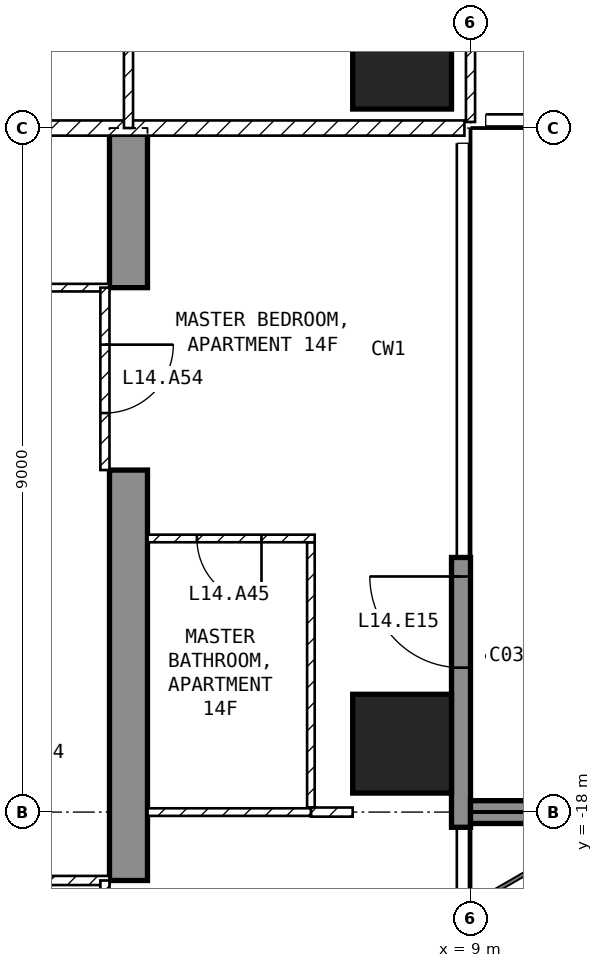
"""IFC4 building model, lengths in metres.
Left out: names, types, materials, properties, quantities, classifications, styles, units other than length and angle.
Written with IfcOpenShell. Run it as: python <this file> out.ifc"""

import sys

from ifc_helpers import new_model, si_unit, direction, frame, frame_2d, origin, origin_2d, place, context, subcontext, project, spatial, polyline, rectangle, outline, extrude, element, fill, save


model = new_model("IFC4")
c1 = context("Model", 3, precision=1e-05, world=origin(), true_north=direction((0.0, 1.0)))
c2 = subcontext(c1, "Body", "Model", "MODEL_VIEW")
j1 = project(units=[si_unit("LENGTHUNIT", "METRE"), si_unit("PLANEANGLEUNIT", "RADIAN")], contexts=[c1])
p1 = place(None, origin())
s1 = spatial("IfcSite", under=j1, at=p1, CompositionType="ELEMENT")
p2 = place(p1, origin())
s2 = spatial("IfcBuilding", under=s1, at=p2, CompositionType="ELEMENT")
p3 = place(p2, frame((0.0, 0.0, 68.0)))
s3 = spatial("IfcBuildingStorey", under=s2, at=p3, CompositionType="ELEMENT", Elevation=68.0)
for number, where, z_axis, x_axis in (
    (1, (8.1, -17.1, -0.25), (0.0, 0.0, 1.0), (1.0, 0.0, 0.0)),
    (2, (8.1, -8.1, -0.25), (0.0, 0.0, 1.0), (1.0, 0.0, 0.0)),
):
    element("IfcColumn", number, at=place(p3, frame(where, z_axis=z_axis, x_axis=x_axis)), inside=s3, PredefinedType="COLUMN", context=c2, shape_type="SweptSolid", body=[
        extrude(rectangle(XDim=1.3, YDim=1.3, at=origin_2d()), origin(), (0.0, 0.0, 1.0), 3.5),
    ])
p4 = place(p3, frame((4.25, -25.45, -0.25), z_axis=(1.0, 0.0, 0.0), x_axis=(0.0, 1.0, 0.0)))
e3 = element("IfcWall", 3, at=p4, inside=s3, PredefinedType="SHEAR", context=c2, shape_type="SweptSolid", body=[
    extrude(outline(polyline([(0.0, 0.0), (4.15, 0.0), (4.15, 2.65), (6.55, 2.65), (6.55, 0.0), (11.95, 0.0), (11.95, 2.65), (14.35, 2.65), (14.35, 0.0), (16.45, 0.0), (16.45, 3.5), (0.0, 3.5), (0.0, 0.0)])), origin(), (0.0, 0.0, 1.0), 0.5),
])
p5 = place(p3, frame((8.875, -18.2, 0.0), z_axis=(0.0, 0.0, 1.0), x_axis=(0.0, 1.0, 0.0)))
e4 = element("IfcWall", 4, at=p5, inside=s3, PredefinedType="SOLIDWALL", context=c2, shape_type="SweptSolid", body=[
    extrude(rectangle(XDim=3.55, YDim=0.25, at=frame_2d((1.775, 0.0))), origin(), (0.0, 0.0, 1.0), 3.25),
])
p6 = place(p5, frame((2.1, 0.0, 0.0)))
e5 = element("IfcOpeningElement", 5, at=p6, cuts=e4, PredefinedType="OPENING", context=c2, shape_type="SweptSolid", body=[
    extrude(rectangle(XDim=1.2, YDim=2.4, at=frame_2d((0.6, 1.2))), frame((0.0, 0.135, 0.0), z_axis=(0.0, -1.0, 0.0), x_axis=(1.0, 0.0, 0.0)), (0.0, 0.0, 1.0), 0.27),
])
p7 = place(p3, frame((9.0, -18.0, 0.0), z_axis=(0.0, 0.0, 1.0), x_axis=(1.0, 0.0, 0.0)))
e6 = element("IfcWall", 6, at=p7, inside=s3, PredefinedType="SOLIDWALL", context=c2, shape_type="SweptSolid", body=[
    extrude(rectangle(XDim=2.7, YDim=0.3, at=frame_2d((1.35, 0.0))), origin(), (0.0, 0.0, 1.0), 3.25),
])
p8 = place(p3, frame((8.92, -9.0, 0.0), z_axis=(0.0, 0.0, 1.0), x_axis=(-1.0, 0.0, 0.0)))
e7 = element("IfcWall", 7, at=p8, inside=s3, PredefinedType="PARTITIONING", context=c2, shape_type="SweptSolid", body=[
    extrude(rectangle(XDim=17.84, YDim=0.2, at=frame_2d((8.92, 0.0))), origin(), (0.0, 0.0, 1.0), 3.25),
])
p9 = place(p8, frame((8.42, 0.0, 0.0)))
e8 = element("IfcOpeningElement", 8, at=p9, cuts=e7, PredefinedType="OPENING", context=c2, shape_type="SweptSolid", body=[
    extrude(rectangle(XDim=1.0, YDim=2.1, at=frame_2d((0.5, 1.05))), frame((0.0, 0.11, 0.0), z_axis=(0.0, -1.0, 0.0), x_axis=(1.0, 0.0, 0.0)), (0.0, 0.0, 1.0), 0.22),
])
p10 = place(p3, frame((9.0, -8.92, 0.0), z_axis=(0.0, 0.0, 1.0), x_axis=(0.0, 1.0, 0.0)))
e9 = element("IfcWall", 9, at=p10, inside=s3, PredefinedType="PARTITIONING", context=c2, shape_type="SweptSolid", body=[
    extrude(rectangle(XDim=7.62, YDim=0.12, at=frame_2d((3.81, 0.0))), origin(), (0.0, 0.0, 1.0), 3.25),
])
p11 = place(p10, frame((2.67, 0.0, 0.0)))
e10 = element("IfcOpeningElement", 10, at=p11, cuts=e9, PredefinedType="OPENING", context=c2, shape_type="SweptSolid", body=[
    extrude(rectangle(XDim=0.9, YDim=2.1, at=frame_2d((0.45, 1.05))), frame((0.0, 0.07, 0.0), z_axis=(0.0, -1.0, 0.0), x_axis=(1.0, 0.0, 0.0)), (0.0, 0.0, 1.0), 0.14),
])
p12 = place(p3, frame((4.5, -9.0, 0.0), z_axis=(0.0, 0.0, 1.0), x_axis=(0.0, 1.0, 0.0)))
e11 = element("IfcWall", 11, at=p12, inside=s3, PredefinedType="PARTITIONING", context=c2, shape_type="SweptSolid", body=[
    extrude(rectangle(XDim=7.7, YDim=0.12, at=frame_2d((3.85, 0.0))), origin(), (0.0, 0.0, 1.0), 3.25),
])
p13 = place(p12, frame((3.4, 0.0, 0.0)))
e12 = element("IfcOpeningElement", 12, at=p13, cuts=e11, PredefinedType="OPENING", context=c2, shape_type="SweptSolid", body=[
    extrude(rectangle(XDim=0.9, YDim=2.1, at=frame_2d((0.45, 1.05))), frame((0.0, 0.07, 0.0), z_axis=(0.0, -1.0, 0.0), x_axis=(1.0, 0.0, 0.0)), (0.0, 0.0, 1.0), 0.14),
])
p14 = place(p3, frame((4.25, -11.1, 0.0), z_axis=(0.0, 0.0, 1.0), x_axis=(-1.0, 0.0, 0.0)))
e13 = element("IfcWall", 13, at=p14, inside=s3, PredefinedType="PARTITIONING", context=c2, shape_type="SweptSolid", body=[
    extrude(rectangle(XDim=2.15, YDim=0.1, at=frame_2d((1.075, 0.0))), origin(), (0.0, 0.0, 1.0), 3.25),
])
p15 = place(p3, frame((4.25, -18.9, 0.0), z_axis=(0.0, 0.0, 1.0), x_axis=(-1.0, 0.0, 0.0)))
e14 = element("IfcWall", 14, at=p15, inside=s3, PredefinedType="PARTITIONING", context=c2, shape_type="SweptSolid", body=[
    extrude(rectangle(XDim=8.5, YDim=0.12, at=frame_2d((4.25, 0.0))), origin(), (0.0, 0.0, 1.0), 3.25),
])
p16 = place(p15, frame((1.925, 0.0, 0.0)))
e15 = element("IfcOpeningElement", 15, at=p16, cuts=e14, PredefinedType="OPENING", context=c2, shape_type="SweptSolid", body=[
    extrude(rectangle(XDim=0.9, YDim=2.1, at=frame_2d((0.45, 1.05))), frame((0.0, 0.07, 0.0), z_axis=(0.0, -1.0, 0.0), x_axis=(1.0, 0.0, 0.0)), (0.0, 0.0, 1.0), 0.14),
])
p17 = place(p3, frame((6.9, -17.94, 0.0), z_axis=(0.0, 0.0, 1.0), x_axis=(0.0, 1.0, 0.0)))
e16 = element("IfcWall", 16, at=p17, inside=s3, PredefinedType="PARTITIONING", context=c2, shape_type="SweptSolid", body=[
    extrude(rectangle(XDim=3.49, YDim=0.1, at=frame_2d((1.745, 0.0))), origin(), (0.0, 0.0, 1.0), 3.25),
])
p18 = place(p3, frame((6.95, -14.4, 0.0), z_axis=(0.0, 0.0, 1.0), x_axis=(-1.0, 0.0, 0.0)))
e17 = element("IfcWall", 17, at=p18, inside=s3, PredefinedType="PARTITIONING", context=c2, shape_type="SweptSolid", body=[
    extrude(rectangle(XDim=2.2, YDim=0.1, at=frame_2d((1.1, 0.0))), origin(), (0.0, 0.0, 1.0), 3.25),
])
p19 = place(p18, frame((0.7, 0.0, 0.0)))
e18 = element("IfcOpeningElement", 18, at=p19, cuts=e17, PredefinedType="OPENING", context=c2, shape_type="SweptSolid", body=[
    extrude(rectangle(XDim=0.85, YDim=2.1, at=frame_2d((0.425, 1.05))), frame((0.0, 0.06, 0.0), z_axis=(0.0, -1.0, 0.0), x_axis=(1.0, 0.0, 0.0)), (0.0, 0.0, 1.0), 0.12),
])
p20 = place(p3, frame((7.45, -18.0, 0.0), z_axis=(0.0, 0.0, 1.0), x_axis=(-1.0, 0.0, 0.0)))
e19 = element("IfcWall", 19, at=p20, inside=s3, PredefinedType="PARTITIONING", context=c2, shape_type="SweptSolid", body=[
    extrude(rectangle(XDim=0.55, YDim=0.12, at=frame_2d((0.275, 0.0))), origin(), (0.0, 0.0, 1.0), 3.25),
])
p21 = place(p3, frame((6.9, -18.0, 0.0), z_axis=(0.0, 0.0, 1.0), x_axis=(-1.0, 0.0, 0.0)))
e20 = element("IfcWall", 20, at=p21, inside=s3, PredefinedType="PARTITIONING", context=c2, shape_type="SweptSolid", body=[
    extrude(rectangle(XDim=2.15, YDim=0.1, at=frame_2d((1.075, 0.0))), origin(), (0.0, 0.0, 1.0), 3.25),
])
p22 = place(p3, frame((4.19, -11.1, 0.0), z_axis=(0.0, 0.0, 1.0), x_axis=(0.0, -1.0, 0.0)))
e21 = element("IfcWall", 21, at=p22, inside=s3, PredefinedType="PARTITIONING", context=c2, shape_type="SweptSolid", body=[
    extrude(rectangle(XDim=2.4, YDim=0.12, at=frame_2d((1.2, 0.0))), origin(), (0.0, 0.0, 1.0), 2.4),
])
p23 = place(p22, frame((0.75, 0.0, 0.0)))
e22 = element("IfcOpeningElement", 22, at=p23, cuts=e21, PredefinedType="OPENING", context=c2, shape_type="SweptSolid", body=[
    extrude(rectangle(XDim=0.9, YDim=2.1, at=frame_2d((0.45, 1.05))), frame((0.0, 0.07, 0.0), z_axis=(0.0, -1.0, 0.0), x_axis=(1.0, 0.0, 0.0)), (0.0, 0.0, 1.0), 0.14),
])
p24 = place(p3, frame((4.19, -18.9, 0.0), z_axis=(0.0, 0.0, 1.0), x_axis=(0.0, -1.0, 0.0)))
e23 = element("IfcWall", 23, at=p24, inside=s3, PredefinedType="PARTITIONING", context=c2, shape_type="SweptSolid", body=[
    extrude(rectangle(XDim=2.4, YDim=0.12, at=frame_2d((1.2, 0.0))), origin(), (0.0, 0.0, 1.0), 2.4),
])
p25 = place(p24, frame((0.75, 0.0, 0.0)))
e24 = element("IfcOpeningElement", 24, at=p25, cuts=e23, PredefinedType="OPENING", context=c2, shape_type="SweptSolid", body=[
    extrude(rectangle(XDim=0.9, YDim=2.1, at=frame_2d((0.45, 1.05))), frame((0.0, 0.07, 0.0), z_axis=(0.0, -1.0, 0.0), x_axis=(1.0, 0.0, 0.0)), (0.0, 0.0, 1.0), 0.14),
])
p26 = place(p6, origin())
e25 = element("IfcDoor", 25, at=p26, inside=s3, OperationType="SINGLE_SWING_RIGHT", PredefinedType="DOOR", context=c2, shape_type="SweptSolid", body=[
    extrude(rectangle(XDim=1.2, YDim=2.4, at=frame_2d((0.6, 1.2))), frame((0.0, 0.025, 0.0), z_axis=(0.0, -1.0, 0.0), x_axis=(1.0, 0.0, 0.0)), (0.0, 0.0, 1.0), 0.05),
])
fill(e5, e25)
p27 = place(p19, origin())
e26 = element("IfcDoor", 26, at=p27, inside=s3, OperationType="SINGLE_SWING_LEFT", PredefinedType="DOOR", context=c2, shape_type="SweptSolid", body=[
    extrude(rectangle(XDim=0.85, YDim=2.1, at=frame_2d((0.425, 1.05))), frame((0.0, 0.025, 0.0), z_axis=(0.0, -1.0, 0.0), x_axis=(1.0, 0.0, 0.0)), (0.0, 0.0, 1.0), 0.05),
])
fill(e18, e26)
p28 = place(p23, origin())
e27 = element("IfcDoor", 27, at=p28, inside=s3, OperationType="SINGLE_SWING_LEFT", PredefinedType="DOOR", context=c2, shape_type="SweptSolid", body=[
    extrude(rectangle(XDim=0.9, YDim=2.1, at=frame_2d((0.45, 1.05))), frame((0.0, 0.025, 0.0), z_axis=(0.0, -1.0, 0.0), x_axis=(1.0, 0.0, 0.0)), (0.0, 0.0, 1.0), 0.05),
])
fill(e22, e27)
save(model, sys.argv[1])
